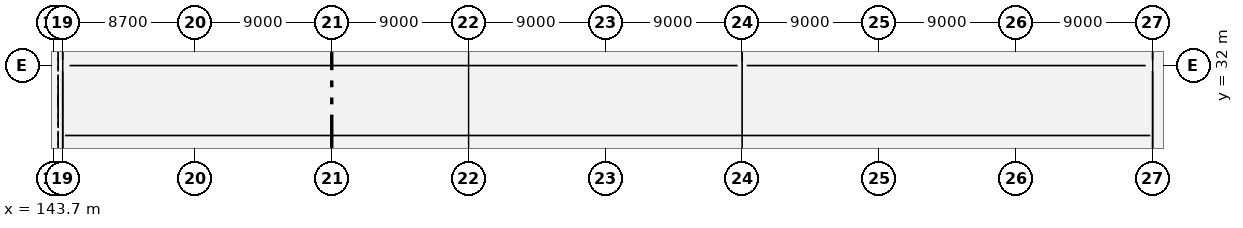
"""IFC4 building model, lengths in metres.
Left out: names, types, materials, properties, quantities, classifications, styles, units other than length and angle.
Written with IfcOpenShell. Run it as: python <this file> out.ifc"""

import sys

from ifc_helpers import new_model, si_unit, direction, frame, frame_2d, origin, origin_2d, place, context, subcontext, project, spatial, rectangle, hollow_rectangle, extrude, element, fill, save


model = new_model("IFC4")
c1 = context("Model", 3, precision=1e-05, world=origin(), true_north=direction((0.0, 1.0)))
c2 = subcontext(c1, "Body", "Model", "MODEL_VIEW")
j1 = project(units=[si_unit("LENGTHUNIT", "METRE"), si_unit("PLANEANGLEUNIT", "RADIAN")], contexts=[c1])
p1 = place(None, origin())
s1 = spatial("IfcSite", under=j1, at=p1, CompositionType="ELEMENT")
p2 = place(p1, origin())
s2 = spatial("IfcBuilding", under=s1, at=p2, CompositionType="ELEMENT")
p3 = place(p2, origin())
s3 = spatial("IfcBuildingStorey", under=s2, at=p3, CompositionType="ELEMENT", Elevation=0.0)
p4 = place(p3, frame((144.3, 32.0, -0.5), z_axis=(0.0, 0.0, 1.0), x_axis=(1.0, 0.0, 0.0)))
e1 = element("IfcColumn", 1, at=p4, inside=s3, PredefinedType="COLUMN", context=c2, shape_type="SweptSolid", body=[
    extrude(rectangle(XDim=0.55, YDim=0.75, at=origin_2d()), origin(), (0.0, 0.0, 1.0), 6.8),
])
for number, where, z_axis, x_axis in (
    (2, (153.0, 32.0, -0.5), (0.0, 0.0, 1.0), (1.0, 0.0, 0.0)),
    (3, (162.0, 32.0, -0.5), (0.0, 0.0, 1.0), (1.0, 0.0, 0.0)),
    (4, (171.0, 32.0, -0.5), (0.0, 0.0, 1.0), (1.0, 0.0, 0.0)),
    (5, (180.0, 32.0, -0.5), (0.0, 0.0, 1.0), (1.0, 0.0, 0.0)),
    (6, (189.0, 32.0, -0.5), (0.0, 0.0, 1.0), (1.0, 0.0, 0.0)),
    (7, (198.0, 32.0, -0.5), (0.0, 0.0, 1.0), (1.0, 0.0, 0.0)),
    (8, (207.0, 32.0, -0.5), (0.0, 0.0, 1.0), (1.0, 0.0, 0.0)),
    (9, (216.0, 32.0, -0.5), (0.0, 0.0, 1.0), (1.0, 0.0, 0.0)),
):
    element("IfcColumn", number, at=place(p3, frame(where, z_axis=z_axis, x_axis=x_axis)), inside=s3, PredefinedType="COLUMN", context=c2, shape_type="SweptSolid", body=[
        extrude(rectangle(XDim=0.7, YDim=0.7, at=origin_2d()), origin(), (0.0, 0.0, 1.0), 6.8),
    ])
p5 = place(p3, frame((144.3, 24.375, 0.0), z_axis=(0.0, 0.0, 1.0), x_axis=(0.0, 1.0, 0.0)))
e10 = element("IfcWall", 10, at=p5, inside=s3, PredefinedType="SOLIDWALL", context=c2, shape_type="SweptSolid", body=[
    extrude(rectangle(XDim=7.25, YDim=0.34, at=frame_2d((3.625, 0.0))), origin(), (0.0, 0.0, 1.0), 5.1),
])
p6 = place(p5, frame((1.112, 0.0, 0.85)))
e11 = element("IfcOpeningElement", 11, at=p6, cuts=e10, PredefinedType="OPENING", context=c2, shape_type="SweptSolid", body=[
    extrude(rectangle(XDim=1.8, YDim=3.15, at=frame_2d((0.9, 1.575))), frame((0.0, 0.18, 0.0), z_axis=(0.0, -1.0, 0.0), x_axis=(1.0, 0.0, 0.0)), (0.0, 0.0, 1.0), 0.36),
])
p7 = place(p5, frame((3.933, 0.0, 0.85)))
e12 = element("IfcOpeningElement", 12, at=p7, cuts=e10, PredefinedType="OPENING", context=c2, shape_type="SweptSolid", body=[
    extrude(rectangle(XDim=1.8, YDim=3.15, at=frame_2d((0.9, 1.575))), frame((0.0, 0.18, 0.0), z_axis=(0.0, -1.0, 0.0), x_axis=(1.0, 0.0, 0.0)), (0.0, 0.0, 1.0), 0.36),
])
p8 = place(p3, frame((144.3, 32.375, 0.0), z_axis=(0.0, 0.0, 1.0), x_axis=(0.0, 1.0, 0.0)))
e13 = element("IfcWall", 13, at=p8, inside=s3, PredefinedType="SOLIDWALL", context=c2, shape_type="SweptSolid", body=[
    extrude(rectangle(XDim=7.25, YDim=0.34, at=frame_2d((3.625, 0.0))), origin(), (0.0, 0.0, 1.0), 5.1),
])
p9 = place(p8, frame((1.417, 0.0, 0.85)))
e14 = element("IfcOpeningElement", 14, at=p9, cuts=e13, PredefinedType="OPENING", context=c2, shape_type="SweptSolid", body=[
    extrude(rectangle(XDim=2.0, YDim=3.3, at=frame_2d((1.0, 1.65))), frame((0.0, 0.18, 0.0), z_axis=(0.0, -1.0, 0.0), x_axis=(1.0, 0.0, 0.0)), (0.0, 0.0, 1.0), 0.36),
])
p10 = place(p8, frame((3.833, 0.0, 0.85)))
e15 = element("IfcOpeningElement", 15, at=p10, cuts=e13, PredefinedType="OPENING", context=c2, shape_type="SweptSolid", body=[
    extrude(rectangle(XDim=2.0, YDim=3.3, at=frame_2d((1.0, 1.65))), frame((0.0, 0.18, 0.0), z_axis=(0.0, -1.0, 0.0), x_axis=(1.0, 0.0, 0.0)), (0.0, 0.0, 1.0), 0.36),
])
p11 = place(p3, frame((216.0, 24.35, 0.0), z_axis=(0.0, 0.0, 1.0), x_axis=(0.0, 1.0, 0.0)))
e16 = element("IfcWall", 16, at=p11, inside=s3, PredefinedType="SOLIDWALL", context=c2, shape_type="SweptSolid", body=[
    extrude(rectangle(XDim=7.3, YDim=0.34, at=frame_2d((3.65, 0.0))), origin(), (0.0, 0.0, 1.0), 5.1),
])
p12 = place(p11, frame((0.937, 0.0, 0.85)))
e17 = element("IfcOpeningElement", 17, at=p12, cuts=e16, PredefinedType="OPENING", context=c2, shape_type="SweptSolid", body=[
    extrude(rectangle(XDim=2.0, YDim=3.3, at=frame_2d((1.0, 1.65))), frame((0.0, 0.18, 0.0), z_axis=(0.0, -1.0, 0.0), x_axis=(1.0, 0.0, 0.0)), (0.0, 0.0, 1.0), 0.36),
])
p13 = place(p11, frame((3.867, 0.0, 0.85)))
e18 = element("IfcOpeningElement", 18, at=p13, cuts=e16, PredefinedType="OPENING", context=c2, shape_type="SweptSolid", body=[
    extrude(rectangle(XDim=2.0, YDim=3.3, at=frame_2d((1.0, 1.65))), frame((0.0, 0.18, 0.0), z_axis=(0.0, -1.0, 0.0), x_axis=(1.0, 0.0, 0.0)), (0.0, 0.0, 1.0), 0.36),
])
p14 = place(p3, frame((216.0, 32.35, 0.0), z_axis=(0.0, 0.0, 1.0), x_axis=(0.0, 1.0, 0.0)))
e19 = element("IfcWall", 19, at=p14, inside=s3, PredefinedType="SOLIDWALL", context=c2, shape_type="SweptSolid", body=[
    extrude(rectangle(XDim=7.3, YDim=0.34, at=frame_2d((3.65, 0.0))), origin(), (0.0, 0.0, 1.0), 5.1),
])
p15 = place(p14, frame((2.45, 0.0, 0.0)))
e20 = element("IfcOpeningElement", 20, at=p15, cuts=e19, PredefinedType="OPENING", context=c2, shape_type="SweptSolid", body=[
    extrude(rectangle(XDim=2.4, YDim=3.1, at=frame_2d((1.2, 1.55))), frame((0.0, 0.18, 0.0), z_axis=(0.0, -1.0, 0.0), x_axis=(1.0, 0.0, 0.0)), (0.0, 0.0, 1.0), 0.36),
])
for number, where, z_axis, x_axis in (
    (21, (196.075, 29.525, -0.5), (0.0, 0.0, 1.0), (1.0, 0.0, 0.0)),
    (22, (204.925, 29.525, -0.5), (0.0, 0.0, 1.0), (1.0, 0.0, 0.0)),
):
    element("IfcColumn", number, at=place(p3, frame(where, z_axis=z_axis, x_axis=x_axis)), inside=s3, PredefinedType="COLUMN", context=c2, shape_type="SweptSolid", body=[
        extrude(hollow_rectangle(XDim=0.2, YDim=0.2, WallThickness=0.01, InnerFilletRadius=0.01, OuterFilletRadius=0.02, at=origin_2d()), origin(), (0.0, 0.0, 1.0), 6.8),
    ])
p16 = place(p3, frame((144.45, 27.4, 0.0), z_axis=(0.0, 0.0, 1.0), x_axis=(1.0, 0.0, 0.0)))
e23 = element("IfcWall", 23, at=p16, inside=s3, PredefinedType="PARTITIONING", context=c2, shape_type="SweptSolid", body=[
    extrude(rectangle(XDim=71.4, YDim=0.125, at=frame_2d((35.7, 0.0))), origin(), (0.0, 0.0, 1.0), 5.95),
])
p17 = place(p16, frame((12.125, 0.0, 0.0)))
e24 = element("IfcOpeningElement", 24, at=p17, cuts=e23, PredefinedType="OPENING", context=c2, shape_type="SweptSolid", body=[
    extrude(rectangle(XDim=1.85, YDim=2.25, at=frame_2d((0.925, 1.125))), frame((0.0, 0.073, 0.0), z_axis=(0.0, -1.0, 0.0), x_axis=(1.0, 0.0, 0.0)), (0.0, 0.0, 1.0), 0.145),
])
p18 = place(p3, frame((144.75, 32.0, 0.0), z_axis=(0.0, 0.0, 1.0), x_axis=(1.0, 0.0, 0.0)))
e25 = element("IfcWall", 25, at=p18, inside=s3, PredefinedType="PARTITIONING", context=c2, shape_type="SweptSolid", body=[
    extrude(rectangle(XDim=43.95, YDim=0.125, at=frame_2d((21.975, 0.0))), origin(), (0.0, 0.0, 1.0), 5.25),
])
p19 = place(p18, frame((12.25, 0.0, 0.0)))
e26 = element("IfcOpeningElement", 26, at=p19, cuts=e25, PredefinedType="OPENING", context=c2, shape_type="SweptSolid", body=[
    extrude(rectangle(XDim=1.0, YDim=2.15, at=frame_2d((0.5, 1.075))), frame((0.0, 0.073, 0.0), z_axis=(0.0, -1.0, 0.0), x_axis=(1.0, 0.0, 0.0)), (0.0, 0.0, 1.0), 0.145),
])
p20 = place(p3, frame((189.3, 32.0, 0.0), z_axis=(0.0, 0.0, 1.0), x_axis=(1.0, 0.0, 0.0)))
e27 = element("IfcWall", 27, at=p20, inside=s3, PredefinedType="PARTITIONING", context=c2, shape_type="SweptSolid", body=[
    extrude(rectangle(XDim=26.25, YDim=0.11, at=frame_2d((13.125, 0.0))), origin(), (0.0, 0.0, 1.0), 5.25),
])
p21 = place(p20, frame((12.71, 0.0, 0.0)))
e28 = element("IfcOpeningElement", 28, at=p21, cuts=e27, PredefinedType="OPENING", context=c2, shape_type="SweptSolid", body=[
    extrude(rectangle(XDim=0.98, YDim=2.12, at=frame_2d((0.49, 1.06))), frame((0.0, 0.065, 0.0), z_axis=(0.0, -1.0, 0.0), x_axis=(1.0, 0.0, 0.0)), (0.0, 0.0, 1.0), 0.13),
])
p22 = place(p3, frame((189.0, 32.3, 0.0), z_axis=(0.0, 0.0, 1.0), x_axis=(0.0, 1.0, 0.0)))
e29 = element("IfcWall", 29, at=p22, inside=s3, PredefinedType="PARTITIONING", context=c2, shape_type="SweptSolid", body=[
    extrude(rectangle(XDim=14.95, YDim=0.1, at=frame_2d((7.475, 0.0))), origin(), (0.0, 0.0, 1.0), 5.35),
])
p23 = place(p6, origin())
e30 = element("IfcWindow", 30, at=p23, inside=s3, PartitioningType="DOUBLE_PANEL_VERTICAL", PredefinedType="WINDOW", context=c2, shape_type="SweptSolid", body=[
    extrude(rectangle(XDim=1.8, YDim=3.15, at=frame_2d((0.9, 1.575))), frame((0.0, 0.03, 0.0), z_axis=(0.0, -1.0, 0.0), x_axis=(1.0, 0.0, 0.0)), (0.0, 0.0, 1.0), 0.06),
])
fill(e11, e30)
p24 = place(p7, origin())
e31 = element("IfcWindow", 31, at=p24, inside=s3, PartitioningType="DOUBLE_PANEL_VERTICAL", PredefinedType="WINDOW", context=c2, shape_type="SweptSolid", body=[
    extrude(rectangle(XDim=1.8, YDim=3.15, at=frame_2d((0.9, 1.575))), frame((0.0, 0.03, 0.0), z_axis=(0.0, -1.0, 0.0), x_axis=(1.0, 0.0, 0.0)), (0.0, 0.0, 1.0), 0.06),
])
fill(e12, e31)
p25 = place(p12, origin())
e32 = element("IfcWindow", 32, at=p25, inside=s3, PartitioningType="DOUBLE_PANEL_VERTICAL", PredefinedType="WINDOW", context=c2, shape_type="SweptSolid", body=[
    extrude(rectangle(XDim=2.0, YDim=3.3, at=frame_2d((1.0, 1.65))), frame((0.0, 0.03, 0.0), z_axis=(0.0, -1.0, 0.0), x_axis=(1.0, 0.0, 0.0)), (0.0, 0.0, 1.0), 0.06),
])
fill(e17, e32)
p26 = place(p13, origin())
e33 = element("IfcWindow", 33, at=p26, inside=s3, PartitioningType="DOUBLE_PANEL_VERTICAL", PredefinedType="WINDOW", context=c2, shape_type="SweptSolid", body=[
    extrude(rectangle(XDim=2.0, YDim=3.3, at=frame_2d((1.0, 1.65))), frame((0.0, 0.03, 0.0), z_axis=(0.0, -1.0, 0.0), x_axis=(1.0, 0.0, 0.0)), (0.0, 0.0, 1.0), 0.06),
])
fill(e18, e33)
p27 = place(p17, origin())
e34 = element("IfcDoor", 34, at=p27, inside=s3, OperationType="DOUBLE_DOOR_SINGLE_SWING", PredefinedType="DOOR", context=c2, shape_type="SweptSolid", body=[
    extrude(rectangle(XDim=1.85, YDim=2.25, at=frame_2d((0.925, 1.125))), frame((0.0, 0.025, 0.0), z_axis=(0.0, -1.0, 0.0), x_axis=(1.0, 0.0, 0.0)), (0.0, 0.0, 1.0), 0.05),
])
fill(e24, e34)
p28 = place(p19, origin())
e35 = element("IfcDoor", 35, at=p28, inside=s3, OperationType="SINGLE_SWING_RIGHT", PredefinedType="DOOR", context=c2, shape_type="SweptSolid", body=[
    extrude(rectangle(XDim=1.0, YDim=2.15, at=frame_2d((0.5, 1.075))), frame((0.0, 0.025, 0.0), z_axis=(0.0, -1.0, 0.0), x_axis=(1.0, 0.0, 0.0)), (0.0, 0.0, 1.0), 0.05),
])
fill(e26, e35)
p29 = place(p21, origin())
e36 = element("IfcDoor", 36, at=p29, inside=s3, OperationType="SINGLE_SWING_LEFT", PredefinedType="DOOR", context=c2, shape_type="SweptSolid", body=[
    extrude(rectangle(XDim=0.98, YDim=2.12, at=frame_2d((0.49, 1.06))), frame((0.0, 0.025, 0.0), z_axis=(0.0, -1.0, 0.0), x_axis=(1.0, 0.0, 0.0)), (0.0, 0.0, 1.0), 0.05),
])
fill(e28, e36)
save(model, sys.argv[1])
